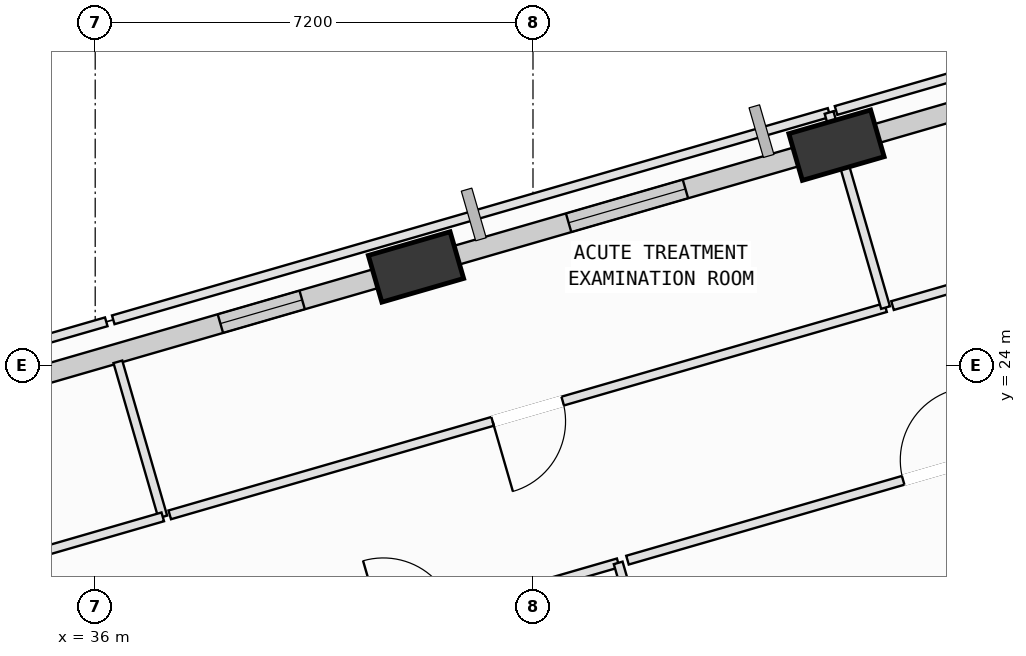
"""IFC4 building model, lengths in metres.
Left out: names, types, materials, properties, quantities, classifications, styles, units other than length and angle.
Written with IfcOpenShell. Run it as: python <this file> out.ifc"""

import sys

from ifc_helpers import new_model, si_unit, direction, frame, frame_2d, origin, origin_2d, place, context, subcontext, project, spatial, rectangle, extrude, element, fill, save


model = new_model("IFC4")
c1 = context("Model", 3, precision=1e-05, world=origin(), true_north=direction((0.0, 1.0)))
c2 = subcontext(c1, "Body", "Model", "MODEL_VIEW")
j1 = project(units=[si_unit("LENGTHUNIT", "METRE"), si_unit("PLANEANGLEUNIT", "RADIAN")], contexts=[c1])
p1 = place(None, origin())
s1 = spatial("IfcSite", under=j1, at=p1, CompositionType="ELEMENT")
p2 = place(p1, origin())
s2 = spatial("IfcBuilding", under=s1, at=p2, CompositionType="ELEMENT")
p3 = place(p2, frame((0.0, 0.0, 92.4)))
s3 = spatial("IfcBuildingStorey", under=s2, at=p3, CompositionType="ELEMENT", Elevation=92.4)
p4 = place(p3, frame((48.191, 27.62, 0.002), z_axis=(-0.012134148462, 0.060243912966, 0.998109930514), x_axis=(-0.886808387337, -0.461821063456, 0.017093551324)))
e1 = element("IfcColumn", 1, at=p4, inside=s3, PredefinedType="COLUMN", context=c2, shape_type="SweptSolid", body=[
    extrude(rectangle(XDim=1.4, YDim=0.8, at=origin_2d()), origin(), (0.0, 0.0, 1.0), 4.004),
])
p5 = place(p3, frame((41.276, 25.617, 0.002), z_axis=(-0.003663585381, 0.031812133057, 0.99948715166), x_axis=(-0.92242354372, -0.386077024865, 0.00890712428)))
e2 = element("IfcColumn", 2, at=p5, inside=s3, PredefinedType="COLUMN", context=c2, shape_type="SweptSolid", body=[
    extrude(rectangle(XDim=1.4, YDim=0.8, at=origin_2d()), origin(), (0.0, 0.0, 1.0), 3.998),
])
p6 = place(p3, frame((48.663, 27.757, 0.0), z_axis=(0.0, 0.0, 1.0), x_axis=(0.960541082189, 0.278138148099, 0.0)))
e3 = element("IfcWall", 3, at=p6, inside=s3, PredefinedType="SOLIDWALL", context=c2, shape_type="SweptSolid", body=[
    extrude(rectangle(XDim=5.404, YDim=0.32, at=frame_2d((2.702, 0.0))), origin(), (0.0, 0.0, 1.0), 2.965),
])
p7 = place(p6, frame((1.898, 0.0, 0.75)))
e4 = element("IfcOpeningElement", 4, at=p7, cuts=e3, PredefinedType="OPENING", context=c2, shape_type="SweptSolid", body=[
    extrude(rectangle(XDim=1.6, YDim=1.95, at=frame_2d((0.8, 0.975))), frame((0.0, 0.17, 0.0), z_axis=(0.0, -1.0, 0.0), x_axis=(1.0, 0.0, 0.0)), (0.0, 0.0, 1.0), 0.34),
])
p8 = place(p3, frame((41.759, 25.757, 0.0), z_axis=(0.0, 0.0, 1.0), x_axis=(0.960538354847, 0.278147566711, 0.0)))
e5 = element("IfcWall", 5, at=p8, inside=s3, PredefinedType="SOLIDWALL", context=c2, shape_type="SweptSolid", body=[
    extrude(rectangle(XDim=6.227, YDim=0.32, at=frame_2d((3.113, 0.0))), origin(), (0.0, 0.0, 1.0), 3.165),
])
p9 = place(p8, frame((2.111, 0.0, 0.75)))
e6 = element("IfcOpeningElement", 6, at=p9, cuts=e5, PredefinedType="OPENING", context=c2, shape_type="SweptSolid", body=[
    extrude(rectangle(XDim=2.0, YDim=1.95, at=frame_2d((1.0, 0.975))), frame((0.0, 0.17, 0.0), z_axis=(0.0, -1.0, 0.0), x_axis=(1.0, 0.0, 0.0)), (0.0, 0.0, 1.0), 0.34),
])
p10 = place(p3, frame((34.847, 23.756, 0.0), z_axis=(0.0, 0.0, 1.0), x_axis=(0.96052833926, 0.278182151618, 0.0)))
e7 = element("IfcWall", 7, at=p10, inside=s3, PredefinedType="SOLIDWALL", context=c2, shape_type="SweptSolid", body=[
    extrude(rectangle(XDim=6.211, YDim=0.32, at=frame_2d((3.105, 0.0))), origin(), (0.0, 0.0, 1.0), 3.165),
])
p11 = place(p10, frame((3.344, 0.0, 0.75)))
e8 = element("IfcOpeningElement", 8, at=p11, cuts=e7, PredefinedType="OPENING", context=c2, shape_type="SweptSolid", body=[
    extrude(rectangle(XDim=1.4, YDim=1.85, at=frame_2d((0.7, 0.925))), frame((0.0, 0.17, 0.0), z_axis=(0.0, -1.0, 0.0), x_axis=(1.0, 0.0, 0.0)), (0.0, 0.0, 1.0), 0.34),
])
p12 = place(p3, frame((38.03, 18.847, 0.0), z_axis=(0.0, 0.0, 1.0), x_axis=(0.960527884636, 0.278183721372, 0.0)))
e9 = element("IfcWall", 9, at=p12, inside=s3, PredefinedType="PARTITIONING", context=c2, shape_type="SweptSolid", body=[
    extrude(rectangle(XDim=6.841, YDim=0.15, at=frame_2d((3.42, 0.0))), origin(), (0.0, 0.0, 1.0), 2.965),
])
p13 = place(p12, frame((2.821, 0.0, 0.0)))
e10 = element("IfcOpeningElement", 10, at=p13, cuts=e9, PredefinedType="OPENING", context=c2, shape_type="SweptSolid", body=[
    extrude(rectangle(XDim=1.2, YDim=2.15, at=frame_2d((0.6, 1.075))), frame((0.0, 0.085, 0.0), z_axis=(0.0, -1.0, 0.0), x_axis=(1.0, 0.0, 0.0)), (0.0, 0.0, 1.0), 0.17),
])
p14 = place(p3, frame((44.601, 20.75, 0.0), z_axis=(0.0, 0.0, 1.0), x_axis=(0.278136254334, -0.960541630553, 0.0)))
e11 = element("IfcWall", 11, at=p14, inside=s3, PredefinedType="PARTITIONING", context=c2, shape_type="SweptSolid", body=[
    extrude(rectangle(XDim=15.165, YDim=0.15, at=frame_2d((7.583, 0.0))), origin(), (0.0, 0.0, 1.0), 3.78),
])
p15 = place(p3, frame((44.754, 20.795, 0.0), z_axis=(0.0, 0.0, 1.0), x_axis=(0.960551683632, 0.278101533745, 0.0)))
e12 = element("IfcWall", 12, at=p15, inside=s3, PredefinedType="PARTITIONING", context=c2, shape_type="SweptSolid", body=[
    extrude(rectangle(XDim=10.64, YDim=0.15, at=frame_2d((5.32, 0.0))), origin(), (0.0, 0.0, 1.0), 3.78),
])
p16 = place(p15, frame((4.72, 0.0, 0.0)))
e13 = element("IfcOpeningElement", 13, at=p16, cuts=e12, PredefinedType="OPENING", context=c2, shape_type="SweptSolid", body=[
    extrude(rectangle(XDim=1.2, YDim=2.15, at=frame_2d((0.6, 1.075))), frame((0.0, 0.085, 0.0), z_axis=(0.0, -1.0, 0.0), x_axis=(1.0, 0.0, 0.0)), (0.0, 0.0, 1.0), 0.17),
])
p17 = place(p3, frame((36.373, 24.057, 0.0), z_axis=(0.0, 0.0, 1.0), x_axis=(0.278035744254, -0.960570728743, 0.0)))
e14 = element("IfcWall", 14, at=p17, inside=s3, PredefinedType="PARTITIONING", context=c2, shape_type="SweptSolid", body=[
    extrude(rectangle(XDim=2.655, YDim=0.15, at=frame_2d((1.327, 0.0))), origin(), (0.0, 0.0, 1.0), 3.78),
])
p18 = place(p3, frame((37.111, 21.507, 0.0), z_axis=(0.0, 0.0, 1.0), x_axis=(-0.96051377414, -0.278232438237, 0.0)))
e15 = element("IfcWall", 15, at=p18, inside=s3, PredefinedType="PARTITIONING", context=c2, shape_type="SweptSolid", body=[
    extrude(rectangle(XDim=3.332, YDim=0.15, at=frame_2d((1.666, 0.0))), origin(), (0.0, 0.0, 1.0), 3.78),
])
p19 = place(p3, frame((28.059, 22.363, 0.0), z_axis=(0.0, 0.0, 1.0), x_axis=(0.960541736942, 0.27813588692, 0.0)))
e16 = element("IfcWall", 16, at=p19, inside=s3, PredefinedType="PARTITIONING", context=c2, shape_type="SweptSolid", body=[
    extrude(rectangle(XDim=8.457, YDim=0.15, at=frame_2d((4.228, 0.0))), origin(), (0.0, 0.0, 1.0), 3.78),
])
p20 = place(p3, frame((48.998, 24.949, 0.0), z_axis=(0.0, 0.0, 1.0), x_axis=(-0.960536816253, -0.278152879948, 0.0)))
e17 = element("IfcWall", 17, at=p20, inside=s3, PredefinedType="PARTITIONING", context=c2, shape_type="SweptSolid", body=[
    extrude(rectangle(XDim=12.256, YDim=0.15, at=frame_2d((6.128, 0.0))), origin(), (0.0, 0.0, 1.0), 2.965),
])
p21 = place(p20, frame((5.528, 0.0, 0.0)))
e18 = element("IfcOpeningElement", 18, at=p21, cuts=e17, PredefinedType="OPENING", context=c2, shape_type="SweptSolid", body=[
    extrude(rectangle(XDim=1.2, YDim=2.15, at=frame_2d((0.6, 1.075))), frame((0.0, 0.085, 0.0), z_axis=(0.0, -1.0, 0.0), x_axis=(1.0, 0.0, 0.0)), (0.0, 0.0, 1.0), 0.17),
])
p22 = place(p3, frame((36.297, 24.748, 0.0), z_axis=(0.0, 0.0, 1.0), x_axis=(0.960536816253, 0.278152879948, 0.0)))
e19 = element("IfcWall", 19, at=p22, inside=s3, PredefinedType="PARTITIONING", context=c2, shape_type="SweptSolid", body=[
    extrude(rectangle(XDim=12.256, YDim=0.15, at=frame_2d((6.128, 0.0))), origin(), (0.0, 0.0, 1.0), 3.165),
])
p23 = place(p3, frame((48.069, 28.157, 0.0), z_axis=(0.0, 0.0, 1.0), x_axis=(0.27814682338, -0.960538570097, 0.0)))
e20 = element("IfcWall", 20, at=p23, inside=s3, PredefinedType="PARTITIONING", context=c2, shape_type="SweptSolid", body=[
    extrude(rectangle(XDim=3.34, YDim=0.15, at=frame_2d((1.67, 0.0))), origin(), (0.0, 0.0, 1.0), 3.78),
])
p24 = place(p3, frame((55.35, 26.788, 0.0), z_axis=(0.0, 0.0, 1.0), x_axis=(-0.960535982283, -0.278155759852, 0.0)))
e21 = element("IfcWall", 21, at=p24, inside=s3, PredefinedType="PARTITIONING", context=c2, shape_type="SweptSolid", body=[
    extrude(rectangle(XDim=6.493, YDim=0.15, at=frame_2d((3.247, 0.0))), origin(), (0.0, 0.0, 1.0), 3.78),
])
p25 = place(p24, frame((2.646, 0.0, 0.0)))
e22 = element("IfcOpeningElement", 22, at=p25, cuts=e21, PredefinedType="OPENING", context=c2, shape_type="SweptSolid", body=[
    extrude(rectangle(XDim=1.2, YDim=2.15, at=frame_2d((0.6, 1.075))), frame((0.0, 0.085, 0.0), z_axis=(0.0, -1.0, 0.0), x_axis=(1.0, 0.0, 0.0)), (0.0, 0.0, 1.0), 0.17),
])
p26 = place(p3, frame((48.184, 28.191, 0.0), z_axis=(0.0, 0.0, 1.0), x_axis=(0.960579012482, 0.278007123612, 0.0)))
e23 = element("IfcWall", 23, at=p26, inside=s3, PredefinedType="PARTITIONING", context=c2, shape_type="SweptSolid", body=[
    extrude(rectangle(XDim=6.748, YDim=0.15, at=frame_2d((3.374, 0.0))), origin(), (0.0, 0.0, 1.0), 2.965),
])
p27 = place(p9, origin())
e24 = element("IfcWindow", 24, at=p27, inside=s3, PartitioningType="SINGLE_PANEL", PredefinedType="WINDOW", context=c2, shape_type="SweptSolid", body=[
    extrude(rectangle(XDim=2.0, YDim=1.95, at=frame_2d((1.0, 0.975))), frame((0.0, 0.03, 0.0), z_axis=(0.0, -1.0, 0.0), x_axis=(1.0, 0.0, 0.0)), (0.0, 0.0, 1.0), 0.06),
])
fill(e6, e24)
p28 = place(p11, origin())
e25 = element("IfcWindow", 25, at=p28, inside=s3, PartitioningType="SINGLE_PANEL", PredefinedType="WINDOW", context=c2, shape_type="SweptSolid", body=[
    extrude(rectangle(XDim=1.4, YDim=1.85, at=frame_2d((0.7, 0.925))), frame((0.0, 0.03, 0.0), z_axis=(0.0, -1.0, 0.0), x_axis=(1.0, 0.0, 0.0)), (0.0, 0.0, 1.0), 0.06),
])
fill(e8, e25)
p29 = place(p16, origin())
e26 = element("IfcDoor", 26, at=p29, inside=s3, OperationType="SINGLE_SWING_RIGHT", PredefinedType="DOOR", context=c2, shape_type="SweptSolid", body=[
    extrude(rectangle(XDim=1.2, YDim=2.15, at=frame_2d((0.6, 1.075))), frame((0.0, 0.025, 0.0), z_axis=(0.0, -1.0, 0.0), x_axis=(1.0, 0.0, 0.0)), (0.0, 0.0, 1.0), 0.05),
])
fill(e13, e26)
p30 = place(p21, origin())
e27 = element("IfcDoor", 27, at=p30, inside=s3, OperationType="SINGLE_SWING_RIGHT", PredefinedType="DOOR", context=c2, shape_type="SweptSolid", body=[
    extrude(rectangle(XDim=1.2, YDim=2.15, at=frame_2d((0.6, 1.075))), frame((0.0, 0.025, 0.0), z_axis=(0.0, -1.0, 0.0), x_axis=(1.0, 0.0, 0.0)), (0.0, 0.0, 1.0), 0.05),
])
fill(e18, e27)
save(model, sys.argv[1])
